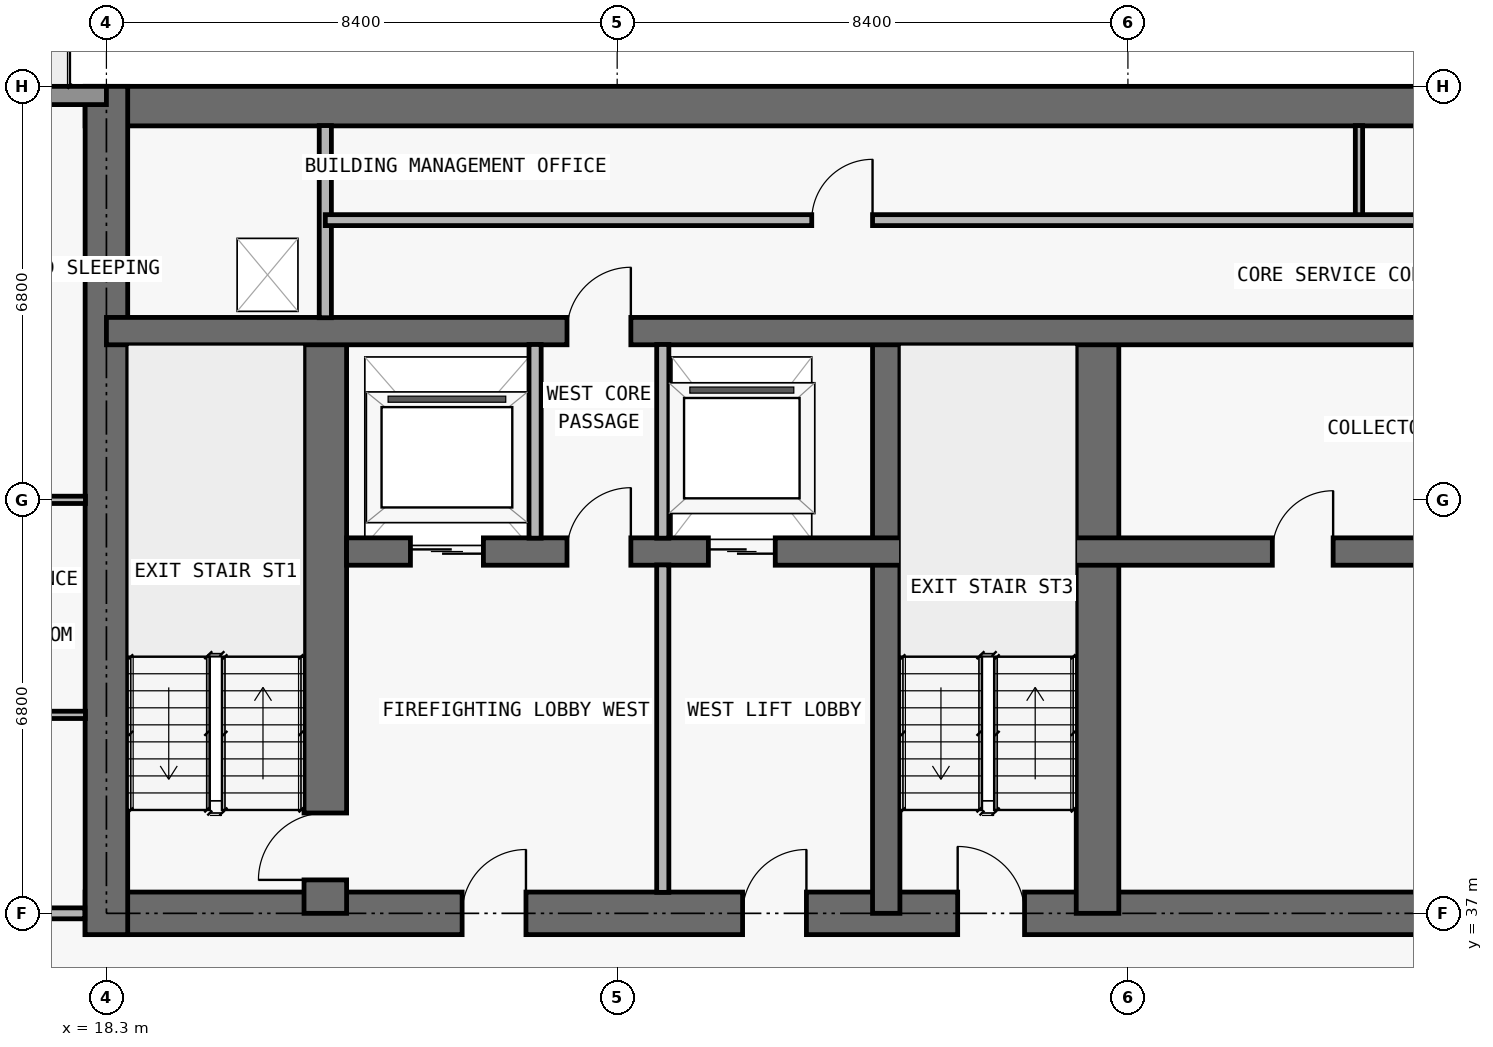
"""IFC4 building model, lengths in metres.
Left out: names, types, materials, properties, quantities, classifications, styles, units other than length and angle.
Written with IfcOpenShell. Run it as: python <this file> out.ifc"""

import sys

from ifc_helpers import new_model, si_unit, direction, frame, frame_2d, origin, place, context, subcontext, project, spatial, rectangle, extrude, element, fill, save


model = new_model("IFC4")
c1 = context("Model", 3, precision=1e-05, world=origin(), true_north=direction((0.0, 1.0)))
c2 = subcontext(c1, "Body", "Model", "MODEL_VIEW")
j1 = project(units=[si_unit("LENGTHUNIT", "METRE"), si_unit("PLANEANGLEUNIT", "RADIAN")], contexts=[c1])
p1 = place(None, origin())
s1 = spatial("IfcSite", under=j1, at=p1, CompositionType="ELEMENT")
p2 = place(p1, origin())
s2 = spatial("IfcBuilding", under=s1, at=p2, CompositionType="ELEMENT")
p3 = place(p2, frame((0.0, 0.0, 195.0)))
s3 = spatial("IfcBuildingStorey", under=s2, at=p3, CompositionType="ELEMENT", Elevation=195.0)
p4 = place(p3, frame((17.95, 37.0, 0.0), z_axis=(0.0, 0.0, 1.0), x_axis=(1.0, 0.0, 0.0)))
e1 = element("IfcWall", 1, at=p4, inside=s3, PredefinedType="SHEAR", context=c2, shape_type="SweptSolid", body=[
    extrude(rectangle(XDim=41.9, YDim=0.7, at=frame_2d((20.95, 0.0))), origin(), (0.0, 0.0, 1.0), 3.05),
])
p5 = place(p4, frame((14.35, 0.0, 0.0)))
e2 = element("IfcOpeningElement", 2, at=p5, cuts=e1, PredefinedType="OPENING", context=c2, shape_type="SweptSolid", body=[
    extrude(rectangle(XDim=1.1, YDim=2.15, at=frame_2d((0.55, 1.075))), frame((0.0, 0.36, 0.0), z_axis=(0.0, -1.0, 0.0), x_axis=(1.0, 0.0, 0.0)), (0.0, 0.0, 1.0), 0.72),
])
p6 = place(p4, frame((6.2, 0.0, 0.0)))
e3 = element("IfcOpeningElement", 3, at=p6, cuts=e1, PredefinedType="OPENING", context=c2, shape_type="SweptSolid", body=[
    extrude(rectangle(XDim=1.05, YDim=2.15, at=frame_2d((0.525, 1.075))), frame((0.0, 0.36, 0.0), z_axis=(0.0, -1.0, 0.0), x_axis=(1.0, 0.0, 0.0)), (0.0, 0.0, 1.0), 0.72),
])
p7 = place(p4, frame((34.7, 0.0, 0.0)))
e4 = element("IfcOpeningElement", 4, at=p7, cuts=e1, PredefinedType="OPENING", context=c2, shape_type="SweptSolid", body=[
    extrude(rectangle(XDim=1.05, YDim=2.15, at=frame_2d((0.525, 1.075))), frame((0.0, 0.36, 0.0), z_axis=(0.0, -1.0, 0.0), x_axis=(1.0, 0.0, 0.0)), (0.0, 0.0, 1.0), 0.72),
])
p8 = place(p4, frame((10.812, 0.0, 0.0)))
e5 = element("IfcOpeningElement", 5, at=p8, cuts=e1, PredefinedType="OPENING", context=c2, shape_type="SweptSolid", body=[
    extrude(rectangle(XDim=1.05, YDim=2.15, at=frame_2d((0.525, 1.075))), frame((0.0, 0.36, 0.0), z_axis=(0.0, -1.0, 0.0), x_axis=(1.0, 0.0, 0.0)), (0.0, 0.0, 1.0), 0.72),
])
p9 = place(p4, frame((24.05, 0.0, 0.0)))
e6 = element("IfcOpeningElement", 6, at=p9, cuts=e1, PredefinedType="OPENING", context=c2, shape_type="SweptSolid", body=[
    extrude(rectangle(XDim=1.05, YDim=2.15, at=frame_2d((0.525, 1.075))), frame((0.0, 0.36, 0.0), z_axis=(0.0, -1.0, 0.0), x_axis=(1.0, 0.0, 0.0)), (0.0, 0.0, 1.0), 0.72),
])
p10 = place(p3, frame((17.95, 50.275, 0.0), z_axis=(0.0, 0.0, 1.0), x_axis=(1.0, 0.0, 0.0)))
e7 = element("IfcWall", 7, at=p10, inside=s3, PredefinedType="SHEAR", context=c2, shape_type="SweptSolid", body=[
    extrude(rectangle(XDim=41.9, YDim=0.65, at=frame_2d((20.95, 0.0))), origin(), (0.0, 0.0, 1.0), 3.05),
])
p11 = place(p3, frame((18.3, 36.65, 0.0), z_axis=(0.0, 0.0, 1.0), x_axis=(0.0, 1.0, 0.0)))
e8 = element("IfcWall", 8, at=p11, inside=s3, PredefinedType="SHEAR", context=c2, shape_type="SweptSolid", body=[
    extrude(rectangle(XDim=13.95, YDim=0.7, at=frame_2d((6.975, 0.0))), origin(), (0.0, 0.0, 1.0), 3.05),
])
p12 = place(p3, frame((21.9, 37.0, 0.0), z_axis=(0.0, 0.0, 1.0), x_axis=(0.0, 1.0, 0.0)))
e9 = element("IfcWall", 9, at=p12, inside=s3, PredefinedType="SHEAR", context=c2, shape_type="SweptSolid", body=[
    extrude(rectangle(XDim=9.575, YDim=0.7, at=frame_2d((4.788, 0.0))), origin(), (0.0, 0.0, 1.0), 3.05),
])
p13 = place(p12, frame((0.55, 0.0, 0.0)))
e10 = element("IfcOpeningElement", 10, at=p13, cuts=e9, PredefinedType="OPENING", context=c2, shape_type="SweptSolid", body=[
    extrude(rectangle(XDim=1.1, YDim=2.15, at=frame_2d((0.55, 1.075))), frame((0.0, 0.36, 0.0), z_axis=(0.0, -1.0, 0.0), x_axis=(1.0, 0.0, 0.0)), (0.0, 0.0, 1.0), 0.72),
])
p14 = place(p3, frame((31.125, 37.0, 0.0), z_axis=(0.0, 0.0, 1.0), x_axis=(0.0, 1.0, 0.0)))
e11 = element("IfcWall", 11, at=p14, inside=s3, PredefinedType="SHEAR", context=c2, shape_type="SweptSolid", body=[
    extrude(rectangle(XDim=9.575, YDim=0.45, at=frame_2d((4.788, 0.0))), origin(), (0.0, 0.0, 1.0), 3.05),
])
p15 = place(p3, frame((34.6, 37.0, 0.0), z_axis=(0.0, 0.0, 1.0), x_axis=(0.0, 1.0, 0.0)))
e12 = element("IfcWall", 12, at=p15, inside=s3, PredefinedType="SHEAR", context=c2, shape_type="SweptSolid", body=[
    extrude(rectangle(XDim=9.575, YDim=0.7, at=frame_2d((4.788, 0.0))), origin(), (0.0, 0.0, 1.0), 3.05),
])
p16 = place(p3, frame((22.25, 42.95, 0.0), z_axis=(0.0, 0.0, 1.0), x_axis=(1.0, 0.0, 0.0)))
e13 = element("IfcWall", 13, at=p16, inside=s3, PredefinedType="SHEAR", context=c2, shape_type="SweptSolid", body=[
    extrude(rectangle(XDim=33.3, YDim=0.45, at=frame_2d((16.65, 0.0))), origin(), (0.0, 0.0, 1.0), 3.05),
])
p17 = place(p16, frame((1.05, 0.0, 0.0)))
e14 = element("IfcOpeningElement", 14, at=p17, cuts=e13, PredefinedType="OPENING", context=c2, shape_type="SweptSolid", body=[
    extrude(rectangle(XDim=1.2, YDim=2.2, at=frame_2d((0.6, 1.1))), frame((0.0, 0.235, 0.0), z_axis=(0.0, -1.0, 0.0), x_axis=(1.0, 0.0, 0.0)), (0.0, 0.0, 1.0), 0.47),
])
p18 = place(p16, frame((31.05, 0.0, 0.0)))
e15 = element("IfcOpeningElement", 15, at=p18, cuts=e13, PredefinedType="OPENING", context=c2, shape_type="SweptSolid", body=[
    extrude(rectangle(XDim=1.2, YDim=2.2, at=frame_2d((0.6, 1.1))), frame((0.0, 0.235, 0.0), z_axis=(0.0, -1.0, 0.0), x_axis=(1.0, 0.0, 0.0)), (0.0, 0.0, 1.0), 0.47),
])
p19 = place(p16, frame((26.45, 0.0, 0.0)))
e16 = element("IfcOpeningElement", 16, at=p19, cuts=e13, PredefinedType="OPENING", context=c2, shape_type="SweptSolid", body=[
    extrude(rectangle(XDim=1.1, YDim=2.2, at=frame_2d((0.55, 1.1))), frame((0.0, 0.235, 0.0), z_axis=(0.0, -1.0, 0.0), x_axis=(1.0, 0.0, 0.0)), (0.0, 0.0, 1.0), 0.47),
])
p20 = place(p16, frame((5.95, 0.0, 0.0)))
e17 = element("IfcOpeningElement", 17, at=p20, cuts=e13, PredefinedType="OPENING", context=c2, shape_type="SweptSolid", body=[
    extrude(rectangle(XDim=1.1, YDim=2.2, at=frame_2d((0.55, 1.1))), frame((0.0, 0.235, 0.0), z_axis=(0.0, -1.0, 0.0), x_axis=(1.0, 0.0, 0.0)), (0.0, 0.0, 1.0), 0.47),
])
p21 = place(p16, frame((3.625, 0.0, 0.0)))
e18 = element("IfcOpeningElement", 18, at=p21, cuts=e13, PredefinedType="OPENING", context=c2, shape_type="SweptSolid", body=[
    extrude(rectangle(XDim=1.05, YDim=2.15, at=frame_2d((0.525, 1.075))), frame((0.0, 0.235, 0.0), z_axis=(0.0, -1.0, 0.0), x_axis=(1.0, 0.0, 0.0)), (0.0, 0.0, 1.0), 0.47),
])
p22 = place(p16, frame((28.675, 0.0, 0.0)))
e19 = element("IfcOpeningElement", 19, at=p22, cuts=e13, PredefinedType="OPENING", context=c2, shape_type="SweptSolid", body=[
    extrude(rectangle(XDim=1.05, YDim=2.15, at=frame_2d((0.525, 1.075))), frame((0.0, 0.235, 0.0), z_axis=(0.0, -1.0, 0.0), x_axis=(1.0, 0.0, 0.0)), (0.0, 0.0, 1.0), 0.47),
])
p23 = place(p16, frame((15.225, 0.0, 0.0)))
e20 = element("IfcOpeningElement", 20, at=p23, cuts=e13, PredefinedType="OPENING", context=c2, shape_type="SweptSolid", body=[
    extrude(rectangle(XDim=1.0, YDim=2.2, at=frame_2d((0.5, 1.1))), frame((0.0, 0.235, 0.0), z_axis=(0.0, -1.0, 0.0), x_axis=(1.0, 0.0, 0.0)), (0.0, 0.0, 1.0), 0.47),
])
p24 = place(p16, frame((21.975, 0.0, 0.0)))
e21 = element("IfcOpeningElement", 21, at=p24, cuts=e13, PredefinedType="OPENING", context=c2, shape_type="SweptSolid", body=[
    extrude(rectangle(XDim=1.0, YDim=2.2, at=frame_2d((0.5, 1.1))), frame((0.0, 0.235, 0.0), z_axis=(0.0, -1.0, 0.0), x_axis=(1.0, 0.0, 0.0)), (0.0, 0.0, 1.0), 0.47),
])
p25 = place(p3, frame((18.3, 46.575, 0.0), z_axis=(0.0, 0.0, 1.0), x_axis=(1.0, 0.0, 0.0)))
e22 = element("IfcWall", 22, at=p25, inside=s3, PredefinedType="SHEAR", context=c2, shape_type="SweptSolid", body=[
    extrude(rectangle(XDim=41.2, YDim=0.45, at=frame_2d((20.6, 0.0))), origin(), (0.0, 0.0, 1.0), 3.05),
])
p26 = place(p25, frame((7.575, 0.0, 0.0)))
e23 = element("IfcOpeningElement", 23, at=p26, cuts=e22, PredefinedType="OPENING", context=c2, shape_type="SweptSolid", body=[
    extrude(rectangle(XDim=1.05, YDim=2.15, at=frame_2d((0.525, 1.075))), frame((0.0, 0.235, 0.0), z_axis=(0.0, -1.0, 0.0), x_axis=(1.0, 0.0, 0.0)), (0.0, 0.0, 1.0), 0.47),
])
p27 = place(p25, frame((32.625, 0.0, 0.0)))
e24 = element("IfcOpeningElement", 24, at=p27, cuts=e22, PredefinedType="OPENING", context=c2, shape_type="SweptSolid", body=[
    extrude(rectangle(XDim=1.05, YDim=2.15, at=frame_2d((0.525, 1.075))), frame((0.0, 0.235, 0.0), z_axis=(0.0, -1.0, 0.0), x_axis=(1.0, 0.0, 0.0)), (0.0, 0.0, 1.0), 0.47),
])
p28 = place(p3, frame((10.1, 50.45, 0.0), z_axis=(0.0, 0.0, 1.0), x_axis=(1.0, 0.0, 0.0)))
e25 = element("IfcWall", 25, at=p28, inside=s3, PredefinedType="STANDARD", context=c2, shape_type="SweptSolid", body=[
    extrude(rectangle(XDim=8.2, YDim=0.3, at=frame_2d((4.1, 0.0))), origin(), (0.0, 0.0, 1.0), 3.05),
])
p29 = place(p28, frame((3.1, 0.0, 0.0)))
e26 = element("IfcOpeningElement", 26, at=p29, cuts=e25, PredefinedType="OPENING", context=c2, shape_type="SweptSolid", body=[
    extrude(rectangle(XDim=2.0, YDim=2.3, at=frame_2d((1.0, 1.15))), frame((0.0, 0.16, 0.0), z_axis=(0.0, -1.0, 0.0), x_axis=(1.0, 0.0, 0.0)), (0.0, 0.0, 1.0), 0.32),
])
p30 = place(p3, frame((21.9, 46.795, 0.0), z_axis=(0.0, 0.0, 1.0), x_axis=(0.0, 1.0, 0.0)))
e27 = element("IfcWall", 27, at=p30, inside=s3, PredefinedType="PARTITIONING", context=c2, shape_type="SweptSolid", body=[
    extrude(rectangle(XDim=3.16, YDim=0.2, at=frame_2d((1.58, 0.0))), origin(), (0.0, 0.0, 1.0), 3.05),
])
p31 = place(p3, frame((25.35, 43.17, 0.0), z_axis=(0.0, 0.0, 1.0), x_axis=(0.0, 1.0, 0.0)))
e28 = element("IfcWall", 28, at=p31, inside=s3, PredefinedType="PARTITIONING", context=c2, shape_type="SweptSolid", body=[
    extrude(rectangle(XDim=3.185, YDim=0.2, at=frame_2d((1.593, 0.0))), origin(), (0.0, 0.0, 1.0), 3.05),
])
p32 = place(p3, frame((27.45, 37.345, 0.0), z_axis=(0.0, 0.0, 1.0), x_axis=(0.0, 1.0, 0.0)))
e29 = element("IfcWall", 29, at=p32, inside=s3, PredefinedType="PARTITIONING", context=c2, shape_type="SweptSolid", body=[
    extrude(rectangle(XDim=5.385, YDim=0.2, at=frame_2d((2.692, 0.0))), origin(), (0.0, 0.0, 1.0), 3.05),
])
p33 = place(p3, frame((27.45, 43.17, 0.0), z_axis=(0.0, 0.0, 1.0), x_axis=(0.0, 1.0, 0.0)))
e30 = element("IfcWall", 30, at=p33, inside=s3, PredefinedType="PARTITIONING", context=c2, shape_type="SweptSolid", body=[
    extrude(rectangle(XDim=3.185, YDim=0.2, at=frame_2d((1.593, 0.0))), origin(), (0.0, 0.0, 1.0), 3.05),
])
p34 = place(p3, frame((38.9, 48.4, 0.0), z_axis=(0.0, 0.0, 1.0), x_axis=(0.0, 1.0, 0.0)))
e31 = element("IfcWall", 31, at=p34, inside=s3, PredefinedType="PARTITIONING", context=c2, shape_type="SweptSolid", body=[
    extrude(rectangle(XDim=1.555, YDim=0.12, at=frame_2d((0.778, 0.0))), origin(), (0.0, 0.0, 1.0), 3.05),
])
p35 = place(p3, frame((10.1, 37.0, 0.0), z_axis=(0.0, 0.0, 1.0), x_axis=(1.0, 0.0, 0.0)))
e32 = element("IfcWall", 32, at=p35, inside=s3, PredefinedType="PARTITIONING", context=c2, shape_type="SweptSolid", body=[
    extrude(rectangle(XDim=7.845, YDim=0.18, at=frame_2d((3.922, 0.0))), origin(), (0.0, 0.0, 1.0), 3.05),
])
p36 = place(p35, frame((3.496, 0.0, 0.0)))
e33 = element("IfcOpeningElement", 33, at=p36, cuts=e32, PredefinedType="OPENING", context=c2, shape_type="SweptSolid", body=[
    extrude(rectangle(XDim=1.0, YDim=2.2, at=frame_2d((0.5, 1.1))), frame((0.0, 0.1, 0.0), z_axis=(0.0, -1.0, 0.0), x_axis=(1.0, 0.0, 0.0)), (0.0, 0.0, 1.0), 0.2),
])
p37 = place(p3, frame((15.65, 40.264, 0.0), z_axis=(0.0, 0.0, 1.0), x_axis=(1.0, 0.0, 0.0)))
e34 = element("IfcWall", 34, at=p37, inside=s3, PredefinedType="PARTITIONING", context=c2, shape_type="SweptSolid", body=[
    extrude(rectangle(XDim=2.305, YDim=0.12, at=frame_2d((1.153, 0.0))), origin(), (0.0, 0.0, 1.0), 3.05),
])
p38 = place(p3, frame((6.395, 43.8, 0.0), z_axis=(0.0, 0.0, 1.0), x_axis=(1.0, 0.0, 0.0)))
e35 = element("IfcWall", 35, at=p38, inside=s3, PredefinedType="PARTITIONING", context=c2, shape_type="SweptSolid", body=[
    extrude(rectangle(XDim=11.56, YDim=0.12, at=frame_2d((5.78, 0.0))), origin(), (0.0, 0.0, 1.0), 2.418),
])
p39 = place(p38, frame((7.251, 0.0, 0.0)))
e36 = element("IfcOpeningElement", 36, at=p39, cuts=e35, PredefinedType="OPENING", context=c2, shape_type="SweptSolid", body=[
    extrude(rectangle(XDim=0.9, YDim=2.15, at=frame_2d((0.45, 1.075))), frame((0.0, 0.07, 0.0), z_axis=(0.0, -1.0, 0.0), x_axis=(1.0, 0.0, 0.0)), (0.0, 0.0, 1.0), 0.14),
])
p40 = place(p38, frame((9.982, 0.0, 0.0)))
e37 = element("IfcOpeningElement", 37, at=p40, cuts=e35, PredefinedType="OPENING", context=c2, shape_type="SweptSolid", body=[
    extrude(rectangle(XDim=0.85, YDim=2.1, at=frame_2d((0.425, 1.05))), frame((0.0, 0.07, 0.0), z_axis=(0.0, -1.0, 0.0), x_axis=(1.0, 0.0, 0.0)), (0.0, 0.0, 1.0), 0.14),
])
p41 = place(p3, frame((21.9, 48.4, 0.0), z_axis=(0.0, 0.0, 1.0), x_axis=(1.0, 0.0, 0.0)))
e38 = element("IfcWall", 38, at=p41, inside=s3, PredefinedType="PARTITIONING", context=c2, shape_type="SweptSolid", body=[
    extrude(rectangle(XDim=34.0, YDim=0.18, at=frame_2d((17.0, 0.0))), origin(), (0.0, 0.0, 1.0), 3.05),
])
p42 = place(p41, frame((8.0, 0.0, 0.0)))
e39 = element("IfcOpeningElement", 39, at=p42, cuts=e38, PredefinedType="OPENING", context=c2, shape_type="SweptSolid", body=[
    extrude(rectangle(XDim=1.0, YDim=2.2, at=frame_2d((0.5, 1.1))), frame((0.0, 0.1, 0.0), z_axis=(0.0, -1.0, 0.0), x_axis=(1.0, 0.0, 0.0)), (0.0, 0.0, 1.0), 0.2),
])
p43 = place(p41, frame((25.0, 0.0, 0.0)))
e40 = element("IfcOpeningElement", 40, at=p43, cuts=e38, PredefinedType="OPENING", context=c2, shape_type="SweptSolid", body=[
    extrude(rectangle(XDim=1.0, YDim=2.2, at=frame_2d((0.5, 1.1))), frame((0.0, 0.1, 0.0), z_axis=(0.0, -1.0, 0.0), x_axis=(1.0, 0.0, 0.0)), (0.0, 0.0, 1.0), 0.2),
])
p44 = place(p17, origin())
e41 = element("IfcDoor", 41, at=p44, inside=s3, OperationType="DOUBLE_DOOR_SLIDING", PredefinedType="DOOR", context=c2, shape_type="SweptSolid", body=[
    extrude(rectangle(XDim=1.2, YDim=2.2, at=frame_2d((0.6, 1.1))), frame((0.0, 0.025, 0.0), z_axis=(0.0, -1.0, 0.0), x_axis=(1.0, 0.0, 0.0)), (0.0, 0.0, 1.0), 0.05),
])
fill(e14, e41)
p45 = place(p20, origin())
e42 = element("IfcDoor", 42, at=p45, inside=s3, OperationType="DOUBLE_DOOR_SLIDING", PredefinedType="DOOR", context=c2, shape_type="SweptSolid", body=[
    extrude(rectangle(XDim=1.1, YDim=2.2, at=frame_2d((0.55, 1.1))), frame((0.0, 0.025, 0.0), z_axis=(0.0, -1.0, 0.0), x_axis=(1.0, 0.0, 0.0)), (0.0, 0.0, 1.0), 0.05),
])
fill(e17, e42)
p46 = place(p5, origin())
e43 = element("IfcDoor", 43, at=p46, inside=s3, OperationType="SINGLE_SWING_LEFT", PredefinedType="DOOR", context=c2, shape_type="SweptSolid", body=[
    extrude(rectangle(XDim=1.1, YDim=2.15, at=frame_2d((0.55, 1.075))), frame((0.0, 0.025, 0.0), z_axis=(0.0, -1.0, 0.0), x_axis=(1.0, 0.0, 0.0)), (0.0, 0.0, 1.0), 0.05),
])
fill(e2, e43)
p47 = place(p6, origin())
e44 = element("IfcDoor", 44, at=p47, inside=s3, OperationType="SINGLE_SWING_RIGHT", PredefinedType="DOOR", context=c2, shape_type="SweptSolid", body=[
    extrude(rectangle(XDim=1.05, YDim=2.15, at=frame_2d((0.525, 1.075))), frame((0.0, 0.025, 0.0), z_axis=(0.0, -1.0, 0.0), x_axis=(1.0, 0.0, 0.0)), (0.0, 0.0, 1.0), 0.05),
])
fill(e3, e44)
p48 = place(p13, origin())
e45 = element("IfcDoor", 45, at=p48, inside=s3, OperationType="SINGLE_SWING_LEFT", PredefinedType="DOOR", context=c2, shape_type="SweptSolid", body=[
    extrude(rectangle(XDim=1.1, YDim=2.15, at=frame_2d((0.55, 1.075))), frame((0.0, 0.025, 0.0), z_axis=(0.0, -1.0, 0.0), x_axis=(1.0, 0.0, 0.0)), (0.0, 0.0, 1.0), 0.05),
])
fill(e10, e45)
p49 = place(p21, origin())
e46 = element("IfcDoor", 46, at=p49, inside=s3, OperationType="SINGLE_SWING_RIGHT", PredefinedType="DOOR", context=c2, shape_type="SweptSolid", body=[
    extrude(rectangle(XDim=1.05, YDim=2.15, at=frame_2d((0.525, 1.075))), frame((0.0, 0.025, 0.0), z_axis=(0.0, -1.0, 0.0), x_axis=(1.0, 0.0, 0.0)), (0.0, 0.0, 1.0), 0.05),
])
fill(e18, e46)
p50 = place(p8, origin())
e47 = element("IfcDoor", 47, at=p50, inside=s3, OperationType="SINGLE_SWING_RIGHT", PredefinedType="DOOR", context=c2, shape_type="SweptSolid", body=[
    extrude(rectangle(XDim=1.05, YDim=2.15, at=frame_2d((0.525, 1.075))), frame((0.0, 0.025, 0.0), z_axis=(0.0, -1.0, 0.0), x_axis=(1.0, 0.0, 0.0)), (0.0, 0.0, 1.0), 0.05),
])
fill(e5, e47)
p51 = place(p23, origin())
e48 = element("IfcDoor", 48, at=p51, inside=s3, OperationType="SINGLE_SWING_RIGHT", PredefinedType="DOOR", context=c2, shape_type="SweptSolid", body=[
    extrude(rectangle(XDim=1.0, YDim=2.2, at=frame_2d((0.5, 1.1))), frame((0.0, 0.025, 0.0), z_axis=(0.0, -1.0, 0.0), x_axis=(1.0, 0.0, 0.0)), (0.0, 0.0, 1.0), 0.05),
])
fill(e20, e48)
p52 = place(p26, origin())
e49 = element("IfcDoor", 49, at=p52, inside=s3, OperationType="SINGLE_SWING_RIGHT", PredefinedType="DOOR", context=c2, shape_type="SweptSolid", body=[
    extrude(rectangle(XDim=1.05, YDim=2.15, at=frame_2d((0.525, 1.075))), frame((0.0, 0.025, 0.0), z_axis=(0.0, -1.0, 0.0), x_axis=(1.0, 0.0, 0.0)), (0.0, 0.0, 1.0), 0.05),
])
fill(e23, e49)
p53 = place(p42, origin())
e50 = element("IfcDoor", 50, at=p53, inside=s3, OperationType="SINGLE_SWING_RIGHT", PredefinedType="DOOR", context=c2, shape_type="SweptSolid", body=[
    extrude(rectangle(XDim=1.0, YDim=2.2, at=frame_2d((0.5, 1.1))), frame((0.0, 0.025, 0.0), z_axis=(0.0, -1.0, 0.0), x_axis=(1.0, 0.0, 0.0)), (0.0, 0.0, 1.0), 0.05),
])
fill(e39, e50)
save(model, sys.argv[1])
